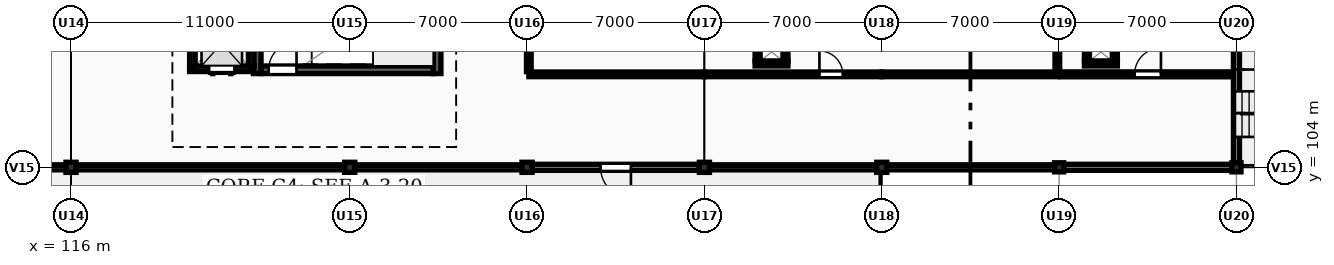
"""IFC4 building model, lengths in metres.
Left out: names, types, materials, properties, quantities, classifications, styles, units other than length and angle.
Written with IfcOpenShell. Run it as: python <this file> out.ifc"""

import sys

from ifc_helpers import new_model, si_unit, direction, frame, frame_2d, origin, origin_2d, place, context, subcontext, project, spatial, rectangle, extrude, element, fill, save


model = new_model("IFC4")
c1 = context("Model", 3, precision=1e-05, world=origin(), true_north=direction((0.0, 1.0)))
c2 = subcontext(c1, "Body", "Model", "MODEL_VIEW")
j1 = project(units=[si_unit("LENGTHUNIT", "METRE"), si_unit("PLANEANGLEUNIT", "RADIAN")], contexts=[c1])
p1 = place(None, origin())
s1 = spatial("IfcSite", under=j1, at=p1, CompositionType="ELEMENT")
p2 = place(p1, origin())
s2 = spatial("IfcBuilding", under=s1, at=p2, CompositionType="ELEMENT")
p3 = place(p2, frame((0.0, 0.0, 12.3)))
s3 = spatial("IfcBuildingStorey", under=s2, at=p3, CompositionType="ELEMENT", Elevation=12.3)
for number, where, z_axis, x_axis in (
    (1, (116.0, 104.0, 0.0), (0.0, 0.0, 1.0), (1.0, 0.0, 0.0)),
    (2, (127.0, 104.0, 0.0), (0.0, 0.0, 1.0), (1.0, 0.0, 0.0)),
    (3, (134.0, 104.0, 0.0), (0.0, 0.0, 1.0), (1.0, 0.0, 0.0)),
    (4, (141.0, 104.0, 0.0), (0.0, 0.0, 1.0), (1.0, 0.0, 0.0)),
    (5, (148.0, 104.0, 0.0), (0.0, 0.0, 1.0), (1.0, 0.0, 0.0)),
):
    element("IfcColumn", number, at=place(p3, frame(where, z_axis=z_axis, x_axis=x_axis)), inside=s3, PredefinedType="COLUMN", context=c2, shape_type="SweptSolid", body=[
        extrude(rectangle(XDim=0.4, YDim=0.4, at=origin_2d()), origin(), (0.0, 0.0, 1.0), 3.9),
    ])
for number, where, z_axis, x_axis in (
    (6, (155.0, 104.0, 0.0), (0.0, 0.0, 1.0), (1.0, 0.0, 0.0)),
    (7, (162.0, 104.0, 0.0), (0.0, 0.0, 1.0), (1.0, 0.0, 0.0)),
):
    element("IfcColumn", number, at=place(p3, frame(where, z_axis=z_axis, x_axis=x_axis)), inside=s3, PredefinedType="COLUMN", context=c2, shape_type="SweptSolid", body=[
        extrude(rectangle(XDim=0.36, YDim=0.36, at=origin_2d()), origin(), (0.0, 0.0, 1.0), 3.9),
    ])
p4 = place(p3, frame((115.8, 104.0, 0.0), z_axis=(0.0, 0.0, 1.0), x_axis=(-1.0, 0.0, 0.0)))
e8 = element("IfcWall", 8, at=p4, inside=s3, PredefinedType="SOLIDWALL", context=c2, shape_type="SweptSolid", body=[
    extrude(rectangle(XDim=8.6, YDim=0.2, at=frame_2d((4.3, 0.0))), origin(), (0.0, 0.0, 1.0), 0.95),
])
p5 = place(p3, frame((162.0, 111.82, 0.0), z_axis=(0.0, 0.0, 1.0), x_axis=(0.0, -1.0, 0.0)))
e9 = element("IfcWall", 9, at=p5, inside=s3, PredefinedType="SOLIDWALL", context=c2, shape_type="SweptSolid", body=[
    extrude(rectangle(XDim=7.64, YDim=0.24, at=frame_2d((3.82, 0.0))), origin(), (0.0, 0.0, 1.0), 3.65),
])
p6 = place(p5, frame((1.5, 0.0, 0.0)))
e10 = element("IfcOpeningElement", 10, at=p6, cuts=e9, PredefinedType="OPENING", context=c2, shape_type="SweptSolid", body=[
    extrude(rectangle(XDim=1.5, YDim=2.15, at=frame_2d((0.75, 1.075))), frame((0.0, 0.13, 0.0), z_axis=(0.0, -1.0, 0.0), x_axis=(1.0, 0.0, 0.0)), (0.0, 0.0, 1.0), 0.26),
])
p7 = place(p3, frame((161.82, 104.0, 0.0), z_axis=(0.0, 0.0, 1.0), x_axis=(-1.0, 0.0, 0.0)))
e11 = element("IfcWall", 11, at=p7, inside=s3, PredefinedType="SOLIDWALL", context=c2, shape_type="SweptSolid", body=[
    extrude(rectangle(XDim=6.64, YDim=0.24, at=frame_2d((3.32, 0.0))), origin(), (0.0, 0.0, 1.0), 3.088),
])
p8 = place(p3, frame((154.82, 104.0, 0.0), z_axis=(0.0, 0.0, 1.0), x_axis=(-1.0, 0.0, 0.0)))
e12 = element("IfcWall", 12, at=p8, inside=s3, PredefinedType="SOLIDWALL", context=c2, shape_type="SweptSolid", body=[
    extrude(rectangle(XDim=6.62, YDim=0.2, at=frame_2d((3.31, 0.0))), origin(), (0.0, 0.0, 1.0), 0.95),
])
p9 = place(p3, frame((147.8, 104.0, 0.0), z_axis=(0.0, 0.0, 1.0), x_axis=(-1.0, 0.0, 0.0)))
e13 = element("IfcWall", 13, at=p9, inside=s3, PredefinedType="SOLIDWALL", context=c2, shape_type="SweptSolid", body=[
    extrude(rectangle(XDim=6.6, YDim=0.2, at=frame_2d((3.3, 0.0))), origin(), (0.0, 0.0, 1.0), 0.95),
])
p10 = place(p3, frame((140.8, 104.0, 0.0), z_axis=(0.0, 0.0, 1.0), x_axis=(-1.0, 0.0, 0.0)))
e14 = element("IfcWall", 14, at=p10, inside=s3, PredefinedType="SOLIDWALL", context=c2, shape_type="SweptSolid", body=[
    extrude(rectangle(XDim=6.6, YDim=0.24, at=frame_2d((3.3, 0.0))), origin(), (0.0, 0.0, 1.0), 3.085),
])
p11 = place(p10, frame((2.7, 0.0, 0.0)))
e15 = element("IfcOpeningElement", 15, at=p11, cuts=e14, PredefinedType="OPENING", context=c2, shape_type="SweptSolid", body=[
    extrude(rectangle(XDim=1.2, YDim=2.15, at=frame_2d((0.6, 1.075))), frame((0.0, 0.13, 0.0), z_axis=(0.0, -1.0, 0.0), x_axis=(1.0, 0.0, 0.0)), (0.0, 0.0, 1.0), 0.26),
])
p12 = place(p3, frame((133.8, 104.0, 0.0), z_axis=(0.0, 0.0, 1.0), x_axis=(-1.0, 0.0, 0.0)))
e16 = element("IfcWall", 16, at=p12, inside=s3, PredefinedType="SOLIDWALL", context=c2, shape_type="SweptSolid", body=[
    extrude(rectangle(XDim=6.6, YDim=0.2, at=frame_2d((3.3, 0.0))), origin(), (0.0, 0.0, 1.0), 0.95),
])
p13 = place(p3, frame((126.8, 104.0, 0.0), z_axis=(0.0, 0.0, 1.0), x_axis=(-1.0, 0.0, 0.0)))
e17 = element("IfcWall", 17, at=p13, inside=s3, PredefinedType="SOLIDWALL", context=c2, shape_type="SweptSolid", body=[
    extrude(rectangle(XDim=10.6, YDim=0.2, at=frame_2d((5.3, 0.0))), origin(), (0.0, 0.0, 1.0), 0.95),
])
for number, where, z_axis, x_axis in (
    (18, (123.35, 107.7, 0.0), (0.0, 0.0, 1.0), (0.0, 1.0, 0.0)),
    (19, (130.45, 111.8, 0.0), (0.0, 0.0, 1.0), (0.0, -1.0, 0.0)),
):
    element("IfcWall", number, at=place(p3, frame(where, z_axis=z_axis, x_axis=x_axis)), inside=s3, PredefinedType="SHEAR", context=c2, shape_type="SweptSolid", body=[
        extrude(rectangle(XDim=4.1, YDim=0.3, at=frame_2d((2.05, 0.0))), origin(), (0.0, 0.0, 1.0), 3.65),
    ])
p14 = place(p3, frame((123.5, 107.85, 0.0), z_axis=(0.0, 0.0, 1.0), x_axis=(1.0, 0.0, 0.0)))
e20 = element("IfcWall", 20, at=p14, inside=s3, PredefinedType="SHEAR", context=c2, shape_type="SweptSolid", body=[
    extrude(rectangle(XDim=6.8, YDim=0.3, at=frame_2d((3.4, 0.0))), origin(), (0.0, 0.0, 1.0), 3.65),
])
p15 = place(p14, frame((0.3, 0.0, 0.0)))
e21 = element("IfcOpeningElement", 21, at=p15, cuts=e20, PredefinedType="OPENING", context=c2, shape_type="SweptSolid", body=[
    extrude(rectangle(XDim=1.1, YDim=2.15, at=frame_2d((0.55, 1.075))), frame((0.0, 0.16, 0.0), z_axis=(0.0, -1.0, 0.0), x_axis=(1.0, 0.0, 0.0)), (0.0, 0.0, 1.0), 0.32),
])
p16 = place(p3, frame((123.22, 107.89, 0.0), z_axis=(0.0, 0.0, 1.0), x_axis=(-1.0, 0.0, 0.0)))
e22 = element("IfcWall", 22, at=p16, inside=s3, PredefinedType="SHEAR", context=c2, shape_type="SweptSolid", body=[
    extrude(rectangle(XDim=2.54, YDim=0.22, at=frame_2d((1.27, 0.0))), origin(), (0.0, 0.0, 1.0), 3.65),
])
p17 = place(p16, frame((0.77, 0.0, 0.0)))
e23 = element("IfcOpeningElement", 23, at=p17, cuts=e22, PredefinedType="OPENING", context=c2, shape_type="SweptSolid", body=[
    extrude(rectangle(XDim=1.0, YDim=2.15, at=frame_2d((0.5, 1.075))), frame((0.0, 0.12, 0.0), z_axis=(0.0, -1.0, 0.0), x_axis=(1.0, 0.0, 0.0)), (0.0, 0.0, 1.0), 0.24),
])
for number, where, z_axis, x_axis in (
    (24, (120.79, 108.0, 0.0), (0.0, 0.0, 1.0), (0.0, 1.0, 0.0)),
    (25, (123.11, 110.3, 0.0), (0.0, 0.0, 1.0), (0.0, -1.0, 0.0)),
):
    element("IfcWall", number, at=place(p3, frame(where, z_axis=z_axis, x_axis=x_axis)), inside=s3, PredefinedType="SHEAR", context=c2, shape_type="SweptSolid", body=[
        extrude(rectangle(XDim=2.3, YDim=0.22, at=frame_2d((1.15, 0.0))), origin(), (0.0, 0.0, 1.0), 3.65),
    ])
p18 = place(p3, frame((144.3, 108.1, 0.0), z_axis=(0.0, 0.0, 1.0), x_axis=(-1.0, 0.0, 0.0)))
e26 = element("IfcWall", 26, at=p18, inside=s3, PredefinedType="PARTITIONING", context=c2, shape_type="SweptSolid", body=[
    extrude(rectangle(XDim=1.3, YDim=0.2, at=frame_2d((0.65, 0.0))), origin(), (0.0, 0.0, 1.0), 3.65),
])
p19 = place(p3, frame((143.1, 108.2, 0.0), z_axis=(0.0, 0.0, 1.0), x_axis=(0.0, 1.0, 0.0)))
e27 = element("IfcWall", 27, at=p19, inside=s3, PredefinedType="PARTITIONING", context=c2, shape_type="SweptSolid", body=[
    extrude(rectangle(XDim=0.7, YDim=0.2, at=frame_2d((0.35, 0.0))), origin(), (0.0, 0.0, 1.0), 3.245),
])
p20 = place(p3, frame((144.2, 108.9, 0.0), z_axis=(0.0, 0.0, 1.0), x_axis=(0.0, -1.0, 0.0)))
e28 = element("IfcWall", 28, at=p20, inside=s3, PredefinedType="PARTITIONING", context=c2, shape_type="SweptSolid", body=[
    extrude(rectangle(XDim=0.7, YDim=0.2, at=frame_2d((0.35, 0.0))), origin(), (0.0, 0.0, 1.0), 3.65),
])
p21 = place(p3, frame((157.3, 108.1, 0.0), z_axis=(0.0, 0.0, 1.0), x_axis=(-1.0, 0.0, 0.0)))
e29 = element("IfcWall", 29, at=p21, inside=s3, PredefinedType="PARTITIONING", context=c2, shape_type="SweptSolid", body=[
    extrude(rectangle(XDim=1.3, YDim=0.2, at=frame_2d((0.65, 0.0))), origin(), (0.0, 0.0, 1.0), 3.65),
])
p22 = place(p3, frame((156.1, 108.2, 0.0), z_axis=(0.0, 0.0, 1.0), x_axis=(0.0, 1.0, 0.0)))
e30 = element("IfcWall", 30, at=p22, inside=s3, PredefinedType="PARTITIONING", context=c2, shape_type="SweptSolid", body=[
    extrude(rectangle(XDim=0.7, YDim=0.2, at=frame_2d((0.35, 0.0))), origin(), (0.0, 0.0, 1.0), 3.65),
])
p23 = place(p3, frame((157.2, 108.9, 0.0), z_axis=(0.0, 0.0, 1.0), x_axis=(0.0, -1.0, 0.0)))
e31 = element("IfcWall", 31, at=p23, inside=s3, PredefinedType="PARTITIONING", context=c2, shape_type="SweptSolid", body=[
    extrude(rectangle(XDim=0.7, YDim=0.2, at=frame_2d((0.35, 0.0))), origin(), (0.0, 0.0, 1.0), 3.248),
])
p24 = place(p3, frame((134.07, 107.67, 0.0), z_axis=(0.0, 0.0, 1.0), x_axis=(1.0, 0.0, 0.0)))
e32 = element("IfcWall", 32, at=p24, inside=s3, PredefinedType="PARTITIONING", context=c2, shape_type="SweptSolid", body=[
    extrude(rectangle(XDim=6.93, YDim=0.185, at=frame_2d((3.465, 0.0))), origin(), (0.0, 0.0, 1.0), 3.65),
])
p25 = place(p3, frame((141.0, 107.67, 0.0), z_axis=(0.0, 0.0, 1.0), x_axis=(1.0, 0.0, 0.0)))
e33 = element("IfcWall", 33, at=p25, inside=s3, PredefinedType="PARTITIONING", context=c2, shape_type="SweptSolid", body=[
    extrude(rectangle(XDim=7.0, YDim=0.185, at=frame_2d((3.5, 0.0))), origin(), (0.0, 0.0, 1.0), 3.65),
])
p26 = place(p25, frame((4.54, 0.0, 0.0)))
e34 = element("IfcOpeningElement", 34, at=p26, cuts=e33, PredefinedType="OPENING", context=c2, shape_type="SweptSolid", body=[
    extrude(rectangle(XDim=0.92, YDim=2.2, at=frame_2d((0.46, 1.1))), frame((0.0, 0.103, 0.0), z_axis=(0.0, -1.0, 0.0), x_axis=(1.0, 0.0, 0.0)), (0.0, 0.0, 1.0), 0.205),
])
p27 = place(p3, frame((148.0, 107.67, 0.0), z_axis=(0.0, 0.0, 1.0), x_axis=(1.0, 0.0, 0.0)))
e35 = element("IfcWall", 35, at=p27, inside=s3, PredefinedType="PARTITIONING", context=c2, shape_type="SweptSolid", body=[
    extrude(rectangle(XDim=6.93, YDim=0.185, at=frame_2d((3.465, 0.0))), origin(), (0.0, 0.0, 1.0), 3.65),
])
p28 = place(p3, frame((134.07, 107.778, 0.0), z_axis=(0.0, 0.0, 1.0), x_axis=(0.0, 1.0, 0.0)))
e36 = element("IfcWall", 36, at=p28, inside=s3, PredefinedType="PARTITIONING", context=c2, shape_type="SweptSolid", body=[
    extrude(rectangle(XDim=4.552, YDim=0.185, at=frame_2d((2.276, 0.0))), origin(), (0.0, 0.0, 1.0), 3.085),
])
p29 = place(p3, frame((154.93, 107.778, 0.0), z_axis=(0.0, 0.0, 1.0), x_axis=(0.0, 1.0, 0.0)))
e37 = element("IfcWall", 37, at=p29, inside=s3, PredefinedType="PARTITIONING", context=c2, shape_type="SweptSolid", body=[
    extrude(rectangle(XDim=4.552, YDim=0.185, at=frame_2d((2.276, 0.0))), origin(), (0.0, 0.0, 1.0), 3.088),
])
p30 = place(p3, frame((155.07, 107.67, 0.0), z_axis=(0.0, 0.0, 1.0), x_axis=(1.0, 0.0, 0.0)))
e38 = element("IfcWall", 38, at=p30, inside=s3, PredefinedType="PARTITIONING", context=c2, shape_type="SweptSolid", body=[
    extrude(rectangle(XDim=6.768, YDim=0.195, at=frame_2d((3.384, 0.0))), origin(), (0.0, 0.0, 1.0), 3.65),
])
p31 = place(p30, frame((2.91, 0.0, 0.0)))
e39 = element("IfcOpeningElement", 39, at=p31, cuts=e38, PredefinedType="OPENING", context=c2, shape_type="SweptSolid", body=[
    extrude(rectangle(XDim=1.04, YDim=2.25, at=frame_2d((0.52, 1.125))), frame((0.0, 0.107, 0.0), z_axis=(0.0, -1.0, 0.0), x_axis=(1.0, 0.0, 0.0)), (0.0, 0.0, 1.0), 0.215),
])
p32 = place(p11, origin())
e40 = element("IfcDoor", 40, at=p32, inside=s3, OperationType="SINGLE_SWING_LEFT", PredefinedType="DOOR", context=c2, shape_type="SweptSolid", body=[
    extrude(rectangle(XDim=1.2, YDim=2.15, at=frame_2d((0.6, 1.075))), frame((0.0, 0.025, 0.0), z_axis=(0.0, -1.0, 0.0), x_axis=(1.0, 0.0, 0.0)), (0.0, 0.0, 1.0), 0.05),
])
fill(e15, e40)
p33 = place(p15, origin())
e41 = element("IfcDoor", 41, at=p33, inside=s3, OperationType="SINGLE_SWING_RIGHT", PredefinedType="DOOR", context=c2, shape_type="SweptSolid", body=[
    extrude(rectangle(XDim=1.1, YDim=2.15, at=frame_2d((0.55, 1.075))), frame((0.0, 0.025, 0.0), z_axis=(0.0, -1.0, 0.0), x_axis=(1.0, 0.0, 0.0)), (0.0, 0.0, 1.0), 0.05),
])
fill(e21, e41)
p34 = place(p17, origin())
e42 = element("IfcDoor", 42, at=p34, inside=s3, OperationType="DOUBLE_DOOR_SLIDING", PredefinedType="DOOR", context=c2, shape_type="SweptSolid", body=[
    extrude(rectangle(XDim=1.0, YDim=2.15, at=frame_2d((0.5, 1.075))), frame((0.0, 0.025, 0.0), z_axis=(0.0, -1.0, 0.0), x_axis=(1.0, 0.0, 0.0)), (0.0, 0.0, 1.0), 0.05),
])
fill(e23, e42)
p35 = place(p26, origin())
e43 = element("IfcDoor", 43, at=p35, inside=s3, OperationType="SINGLE_SWING_LEFT", PredefinedType="DOOR", context=c2, shape_type="SweptSolid", body=[
    extrude(rectangle(XDim=0.92, YDim=2.2, at=frame_2d((0.46, 1.1))), frame((0.0, 0.025, 0.0), z_axis=(0.0, -1.0, 0.0), x_axis=(1.0, 0.0, 0.0)), (0.0, 0.0, 1.0), 0.05),
])
fill(e34, e43)
p36 = place(p31, origin())
e44 = element("IfcDoor", 44, at=p36, inside=s3, OperationType="SINGLE_SWING_RIGHT", PredefinedType="DOOR", context=c2, shape_type="SweptSolid", body=[
    extrude(rectangle(XDim=1.04, YDim=2.25, at=frame_2d((0.52, 1.125))), frame((0.0, 0.025, 0.0), z_axis=(0.0, -1.0, 0.0), x_axis=(1.0, 0.0, 0.0)), (0.0, 0.0, 1.0), 0.05),
])
fill(e39, e44)
save(model, sys.argv[1])
